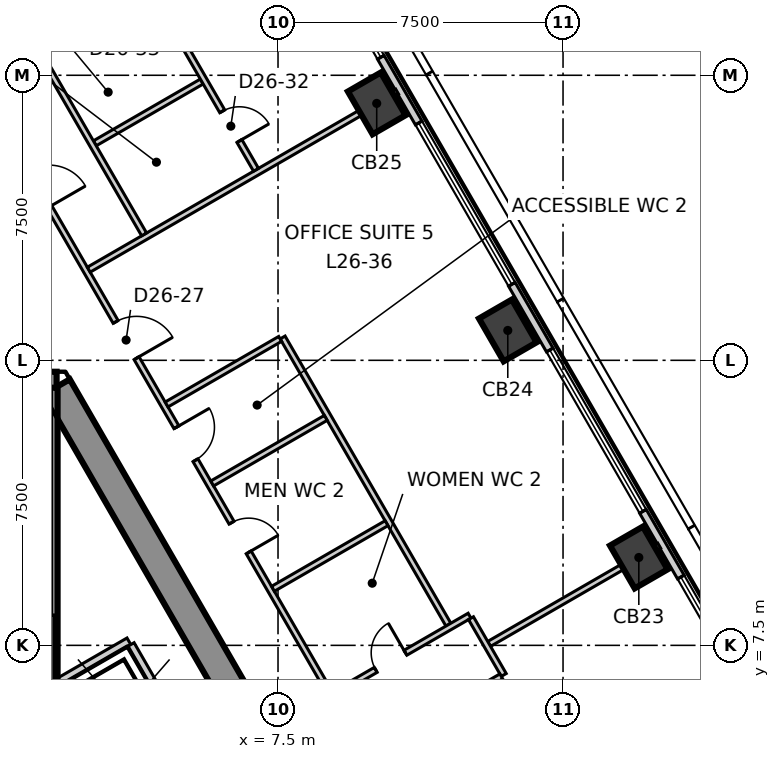
"""IFC4 building model, lengths in metres.
Left out: names, types, materials, properties, quantities, classifications, styles, units other than length and angle.
Written with IfcOpenShell. Run it as: python <this file> out.ifc"""

import sys

from ifc_helpers import new_model, si_unit, direction, frame, frame_2d, origin, origin_2d, place, context, subcontext, project, spatial, polyline, rectangle, outline, extrude, element, fill, save


model = new_model("IFC4")
c1 = context("Model", 3, precision=1e-05, world=origin(), true_north=direction((0.0, 1.0)))
c2 = subcontext(c1, "Body", "Model", "MODEL_VIEW")
j1 = project(units=[si_unit("LENGTHUNIT", "METRE"), si_unit("PLANEANGLEUNIT", "RADIAN")], contexts=[c1])
p1 = place(None, origin())
s1 = spatial("IfcSite", under=j1, at=p1, CompositionType="ELEMENT")
p2 = place(p1, origin())
s2 = spatial("IfcBuilding", under=s1, at=p2, CompositionType="ELEMENT")
p3 = place(p2, frame((0.0, 0.0, 116.3)))
s3 = spatial("IfcBuildingStorey", under=s2, at=p3, CompositionType="ELEMENT", Elevation=116.3)
p4 = place(p3, frame((1.674, 14.3, -0.3), z_axis=(0.0, 0.0, 1.0), x_axis=(-1.0, 0.0, 0.0)))
e1 = element("IfcWall", 1, at=p4, inside=s3, PredefinedType="SHEAR", context=c2, shape_type="SweptSolid", body=[
    extrude(outline(polyline([(-0.231, -0.4), (1.674, -0.4), (3.579, -0.4), (3.117, 0.4), (1.674, 0.4), (0.231, 0.4), (-0.231, -0.4)])), origin(), (0.0, 0.0, 1.0), 4.0),
])
p5 = place(p4, frame((0.974, 0.0, 0.3)))
e2 = element("IfcOpeningElement", 2, at=p5, cuts=e1, PredefinedType="OPENING", context=c2, shape_type="SweptSolid", body=[
    extrude(rectangle(XDim=1.4, YDim=2.1, at=frame_2d((0.7, 1.05))), frame((0.0, 0.41, 0.0), z_axis=(0.0, -1.0, 0.0), x_axis=(1.0, 0.0, 0.0)), (0.0, 0.0, 1.0), 0.82),
])
p6 = place(p3, frame((13.221, -5.7, -0.3), z_axis=(0.0, 0.0, 1.0), x_axis=(-0.499995765644, 0.866027848477, 0.0)))
e3 = element("IfcWall", 3, at=p6, inside=s3, PredefinedType="SHEAR", context=c2, shape_type="SweptSolid", body=[
    extrude(outline(polyline([(-0.231, -0.4), (1.732, -0.4), (3.695, -0.4), (5.658, -0.4), (7.621, -0.4), (9.584, -0.4), (11.547, -0.4), (13.51, -0.4), (15.473, -0.4), (17.436, -0.4), (19.399, -0.4), (21.362, -0.4), (23.325, -0.4), (22.863, 0.4), (20.977, 0.4), (19.091, 0.4), (17.205, 0.4), (15.319, 0.4), (13.433, 0.4), (11.547, 0.4), (9.661, 0.4), (7.775, 0.4), (5.889, 0.4), (4.003, 0.4), (2.117, 0.4), (0.231, 0.4), (-0.231, -0.4)])), origin(), (0.0, 0.0, 1.0), 4.0),
])
p7 = place(p6, frame((10.647, 0.0, 0.3)))
e4 = element("IfcOpeningElement", 4, at=p7, cuts=e3, PredefinedType="OPENING", context=c2, shape_type="SweptSolid", body=[
    extrude(rectangle(XDim=1.8, YDim=2.1, at=frame_2d((0.9, 1.05))), frame((0.0, 0.41, 0.0), z_axis=(0.0, -1.0, 0.0), x_axis=(1.0, 0.0, 0.0)), (0.0, 0.0, 1.0), 0.82),
])
for number, where, z_axis, x_axis in (
    (5, (16.994, 9.812, -0.3), (0.0, 0.0, 1.0), (-0.5, 0.866, 0.0)),
    (6, (13.546, 15.786, -0.3), (0.0, 0.0, 1.0), (-0.5, 0.866, 0.0)),
    (7, (10.097, 21.76, -0.3), (0.0, 0.0, 1.0), (-0.5, 0.866, 0.0)),
):
    element("IfcColumn", number, at=place(p3, frame(where, z_axis=z_axis, x_axis=x_axis)), inside=s3, PredefinedType="COLUMN", context=c2, shape_type="SweptSolid", body=[
        extrude(rectangle(XDim=1.3, YDim=1.0, at=origin_2d()), origin(), (0.0, 0.0, 1.0), 4.0),
    ])
p8 = place(p3, frame((32.048, -14.861, 0.0), z_axis=(0.0, 0.0, 1.0), x_axis=(-0.499996704161, 0.866027306629, 0.0)))
e8 = element("IfcWall", 8, at=p8, inside=s3, PredefinedType="ELEMENTEDWALL", context=c2, shape_type="SweptSolid", body=[
    extrude(rectangle(XDim=57.769, YDim=0.2, at=frame_2d((28.884, 0.0))), origin(), (0.0, 0.0, 1.0), 3.7),
])
p9 = place(p8, frame((2.302, 0.0, 0.9)))
e9 = element("IfcOpeningElement", 9, at=p9, cuts=e8, PredefinedType="OPENING", context=c2, shape_type="SweptSolid", body=[
    extrude(rectangle(XDim=4.9, YDim=2.5, at=frame_2d((2.45, 1.25))), frame((0.0, 0.11, 0.0), z_axis=(0.0, -1.0, 0.0), x_axis=(1.0, 0.0, 0.0)), (0.0, 0.0, 1.0), 0.22),
])
p10 = place(p8, frame((9.199, 0.0, 0.9)))
e10 = element("IfcOpeningElement", 10, at=p10, cuts=e8, PredefinedType="OPENING", context=c2, shape_type="SweptSolid", body=[
    extrude(rectangle(XDim=4.9, YDim=2.5, at=frame_2d((2.45, 1.25))), frame((0.0, 0.11, 0.0), z_axis=(0.0, -1.0, 0.0), x_axis=(1.0, 0.0, 0.0)), (0.0, 0.0, 1.0), 0.22),
])
p11 = place(p8, frame((16.097, 0.0, 0.9)))
e11 = element("IfcOpeningElement", 11, at=p11, cuts=e8, PredefinedType="OPENING", context=c2, shape_type="SweptSolid", body=[
    extrude(rectangle(XDim=4.9, YDim=2.5, at=frame_2d((2.45, 1.25))), frame((0.0, 0.11, 0.0), z_axis=(0.0, -1.0, 0.0), x_axis=(1.0, 0.0, 0.0)), (0.0, 0.0, 1.0), 0.22),
])
p12 = place(p8, frame((22.995, 0.0, 0.9)))
e12 = element("IfcOpeningElement", 12, at=p12, cuts=e8, PredefinedType="OPENING", context=c2, shape_type="SweptSolid", body=[
    extrude(rectangle(XDim=4.9, YDim=2.5, at=frame_2d((2.45, 1.25))), frame((0.0, 0.11, 0.0), z_axis=(0.0, -1.0, 0.0), x_axis=(1.0, 0.0, 0.0)), (0.0, 0.0, 1.0), 0.22),
])
p13 = place(p8, frame((29.893, 0.0, 0.9)))
e13 = element("IfcOpeningElement", 13, at=p13, cuts=e8, PredefinedType="OPENING", context=c2, shape_type="SweptSolid", body=[
    extrude(rectangle(XDim=4.9, YDim=2.5, at=frame_2d((2.45, 1.25))), frame((0.0, 0.11, 0.0), z_axis=(0.0, -1.0, 0.0), x_axis=(1.0, 0.0, 0.0)), (0.0, 0.0, 1.0), 0.22),
])
p14 = place(p8, frame((36.791, 0.0, 0.9)))
e14 = element("IfcOpeningElement", 14, at=p14, cuts=e8, PredefinedType="OPENING", context=c2, shape_type="SweptSolid", body=[
    extrude(rectangle(XDim=4.9, YDim=2.5, at=frame_2d((2.45, 1.25))), frame((0.0, 0.11, 0.0), z_axis=(0.0, -1.0, 0.0), x_axis=(1.0, 0.0, 0.0)), (0.0, 0.0, 1.0), 0.22),
])
p15 = place(p8, frame((43.689, 0.0, 0.9)))
e15 = element("IfcOpeningElement", 15, at=p15, cuts=e8, PredefinedType="OPENING", context=c2, shape_type="SweptSolid", body=[
    extrude(rectangle(XDim=4.9, YDim=2.5, at=frame_2d((2.45, 1.25))), frame((0.0, 0.11, 0.0), z_axis=(0.0, -1.0, 0.0), x_axis=(1.0, 0.0, 0.0)), (0.0, 0.0, 1.0), 0.22),
])
p16 = place(p8, frame((50.587, 0.0, 0.9)))
e16 = element("IfcOpeningElement", 16, at=p16, cuts=e8, PredefinedType="OPENING", context=c2, shape_type="SweptSolid", body=[
    extrude(rectangle(XDim=4.9, YDim=2.5, at=frame_2d((2.45, 1.25))), frame((0.0, 0.11, 0.0), z_axis=(0.0, -1.0, 0.0), x_axis=(1.0, 0.0, 0.0)), (0.0, 0.0, 1.0), 0.22),
])
p17 = place(p3, frame((13.055, 7.538, 0.0), z_axis=(0.0, 0.0, 1.0), x_axis=(0.866048717436, 0.499959617396, 0.0)))
e17 = element("IfcWall", 17, at=p17, inside=s3, PredefinedType="PARTITIONING", context=c2, shape_type="SweptSolid", body=[
    extrude(rectangle(XDim=5.168, YDim=0.15, at=frame_2d((2.584, 0.0))), origin(), (0.0, 0.0, 1.0), 3.2),
])
p18 = place(p3, frame((0.076, 21.468, 0.0), z_axis=(0.0, 0.0, 1.0), x_axis=(0.500006592492, -0.866021597574, 0.0)))
e18 = element("IfcWall", 18, at=p18, inside=s3, PredefinedType="PARTITIONING", context=c2, shape_type="SweptSolid", body=[
    extrude(rectangle(XDim=17.652, YDim=0.15, at=frame_2d((8.826, 0.0))), origin(), (0.0, 0.0, 1.0), 3.7),
])
p19 = place(p18, frame((6.303, 0.0, 0.0)))
e19 = element("IfcOpeningElement", 19, at=p19, cuts=e18, PredefinedType="OPENING", context=c2, shape_type="SweptSolid", body=[
    extrude(rectangle(XDim=1.1, YDim=2.1, at=frame_2d((0.55, 1.05))), frame((0.0, 0.085, 0.0), z_axis=(0.0, -1.0, 0.0), x_axis=(1.0, 0.0, 0.0)), (0.0, 0.0, 1.0), 0.17),
])
p20 = place(p18, frame((12.403, 0.0, 0.0)))
e20 = element("IfcOpeningElement", 20, at=p20, cuts=e18, PredefinedType="OPENING", context=c2, shape_type="SweptSolid", body=[
    extrude(rectangle(XDim=0.9, YDim=2.1, at=frame_2d((0.45, 1.05))), frame((0.0, 0.085, 0.0), z_axis=(0.0, -1.0, 0.0), x_axis=(1.0, 0.0, 0.0)), (0.0, 0.0, 1.0), 0.17),
])
p21 = place(p18, frame((9.503, 0.0, 0.0)))
e21 = element("IfcOpeningElement", 21, at=p21, cuts=e18, PredefinedType="OPENING", context=c2, shape_type="SweptSolid", body=[
    extrude(rectangle(XDim=1.0, YDim=2.1, at=frame_2d((0.5, 1.05))), frame((0.0, 0.085, 0.0), z_axis=(0.0, -1.0, 0.0), x_axis=(1.0, 0.0, 0.0)), (0.0, 0.0, 1.0), 0.17),
])
p22 = place(p18, frame((1.708, 0.0, 0.0)))
e22 = element("IfcOpeningElement", 22, at=p22, cuts=e18, PredefinedType="OPENING", context=c2, shape_type="SweptSolid", body=[
    extrude(rectangle(XDim=1.1, YDim=2.1, at=frame_2d((0.55, 1.05))), frame((0.0, 0.085, 0.0), z_axis=(0.0, -1.0, 0.0), x_axis=(1.0, 0.0, 0.0)), (0.0, 0.0, 1.0), 0.17),
])
p23 = place(p3, frame((2.52, 17.385, 0.0), z_axis=(0.0, 0.0, 1.0), x_axis=(0.866005502057, 0.500034469219, 0.0)))
e23 = element("IfcWall", 23, at=p23, inside=s3, PredefinedType="PARTITIONING", context=c2, shape_type="SweptSolid", body=[
    extrude(rectangle(XDim=9.369, YDim=0.15, at=frame_2d((4.685, 0.0))), origin(), (0.0, 0.0, 1.0), 3.7),
])
p24 = place(p3, frame((7.621, 15.601, 0.0), z_axis=(0.0, 0.0, 1.0), x_axis=(0.499937230245, -0.866061640887, 0.0)))
e24 = element("IfcWall", 24, at=p24, inside=s3, PredefinedType="PARTITIONING", context=c2, shape_type="SweptSolid", body=[
    extrude(rectangle(XDim=8.725, YDim=0.15, at=frame_2d((4.362, 0.0))), origin(), (0.0, 0.0, 1.0), 3.7),
])
p25 = place(p3, frame((4.568, 13.838, 0.0), z_axis=(0.0, 0.0, 1.0), x_axis=(0.866013532718, 0.500020560727, 0.0)))
e25 = element("IfcWall", 25, at=p25, inside=s3, PredefinedType="PARTITIONING", context=c2, shape_type="SweptSolid", body=[
    extrude(rectangle(XDim=3.45, YDim=0.15, at=frame_2d((1.725, 0.0))), origin(), (0.0, 0.0, 1.0), 3.7),
])
for number, where, z_axis, x_axis in (
    (26, (5.768, 11.76, 0.0), (0.0, 0.0, 1.0), (0.866, 0.5, 0.0)),
    (27, (7.368, 8.989, 0.0), (0.0, 0.0, 1.0), (0.866, 0.5, 0.0)),
):
    element("IfcWall", number, at=place(p3, frame(where, z_axis=z_axis, x_axis=x_axis)), inside=s3, PredefinedType="PARTITIONING", context=c2, shape_type="SweptSolid", body=[
        extrude(rectangle(XDim=3.45, YDim=0.15, at=frame_2d((1.725, 0.0))), origin(), (0.0, 0.0, 1.0), 3.7),
    ])
p26 = place(p3, frame((8.969, 6.218, 0.0), z_axis=(0.0, 0.0, 1.0), x_axis=(0.865997263264, 0.500048737644, 0.0)))
e28 = element("IfcWall", 28, at=p26, inside=s3, PredefinedType="PARTITIONING", context=c2, shape_type="SweptSolid", body=[
    extrude(rectangle(XDim=4.124, YDim=0.15, at=frame_2d((2.062, 0.0))), origin(), (0.0, 0.0, 1.0), 3.7),
])
p27 = place(p26, frame((1.274, 0.0, 0.0)))
e29 = element("IfcOpeningElement", 29, at=p27, cuts=e28, PredefinedType="OPENING", context=c2, shape_type="SweptSolid", body=[
    extrude(rectangle(XDim=0.9, YDim=2.1, at=frame_2d((0.45, 1.05))), frame((0.0, 0.085, 0.0), z_axis=(0.0, -1.0, 0.0), x_axis=(1.0, 0.0, 0.0)), (0.0, 0.0, 1.0), 0.17),
])
p28 = place(p3, frame((12.578, 8.215, 0.0), z_axis=(0.0, 0.0, 1.0), x_axis=(0.499746958151, -0.866171448282, 0.0)))
e30 = element("IfcWall", 30, at=p28, inside=s3, PredefinedType="PARTITIONING", context=c2, shape_type="SweptSolid", body=[
    extrude(rectangle(XDim=1.725, YDim=0.15, at=frame_2d((0.863, 0.0))), origin(), (0.0, 0.0, 1.0), 3.7),
])
p29 = place(p3, frame((9.869, 4.659, 0.0), z_axis=(0.0, 0.0, 1.0), x_axis=(0.866033948129, 0.499985200469, 0.0)))
e31 = element("IfcWall", 31, at=p29, inside=s3, PredefinedType="PARTITIONING", context=c2, shape_type="SweptSolid", body=[
    extrude(rectangle(XDim=4.048, YDim=0.15, at=frame_2d((2.024, 0.0))), origin(), (0.0, 0.0, 1.0), 3.7),
])
p30 = place(p3, frame((2.679, 20.71, 0.0), z_axis=(0.0, 0.0, 1.0), x_axis=(0.865977875238, 0.500082312822, 0.0)))
e32 = element("IfcWall", 32, at=p30, inside=s3, PredefinedType="PARTITIONING", context=c2, shape_type="SweptSolid", body=[
    extrude(rectangle(XDim=3.25, YDim=0.15, at=frame_2d((1.625, 0.0))), origin(), (0.0, 0.0, 1.0), 3.7),
])
p31 = place(p3, frame((4.158, 24.798, 0.0), z_axis=(0.0, 0.0, 1.0), x_axis=(0.5000309746, -0.866007519852, 0.0)))
e33 = element("IfcWall", 33, at=p31, inside=s3, PredefinedType="PARTITIONING", context=c2, shape_type="SweptSolid", body=[
    extrude(rectangle(XDim=5.526, YDim=0.15, at=frame_2d((2.763, 0.0))), origin(), (0.0, 0.0, 1.0), 3.7),
])
p32 = place(p31, frame((3.75, 0.0, 0.0)))
e34 = element("IfcOpeningElement", 34, at=p32, cuts=e33, PredefinedType="OPENING", context=c2, shape_type="SweptSolid", body=[
    extrude(rectangle(XDim=0.9, YDim=2.1, at=frame_2d((0.45, 1.05))), frame((0.0, 0.085, 0.0), z_axis=(0.0, -1.0, 0.0), x_axis=(1.0, 0.0, 0.0)), (0.0, 0.0, 1.0), 0.17),
])
p33 = place(p3, frame((1.214, 23.098, 0.0), z_axis=(0.0, 0.0, 1.0), x_axis=(0.866029041019, 0.499993700073, 0.0)))
e35 = element("IfcWall", 35, at=p33, inside=s3, PredefinedType="PARTITIONING", context=c2, shape_type="SweptSolid", body=[
    extrude(rectangle(XDim=3.324, YDim=0.15, at=frame_2d((1.662, 0.0))), origin(), (0.0, 0.0, 1.0), 3.7),
])
p34 = place(p33, frame((1.25, 0.0, 0.0)))
e36 = element("IfcOpeningElement", 36, at=p34, cuts=e35, PredefinedType="OPENING", context=c2, shape_type="SweptSolid", body=[
    extrude(rectangle(XDim=0.9, YDim=2.1, at=frame_2d((0.45, 1.05))), frame((0.0, 0.085, 0.0), z_axis=(0.0, -1.0, 0.0), x_axis=(1.0, 0.0, 0.0)), (0.0, 0.0, 1.0), 0.17),
])
p35 = place(p3, frame((1.251, 23.033, 0.0), z_axis=(0.0, 0.0, 1.0), x_axis=(0.500002931134, -0.866023711487, 0.0)))
e37 = element("IfcWall", 37, at=p35, inside=s3, PredefinedType="PARTITIONING", context=c2, shape_type="SweptSolid", body=[
    extrude(rectangle(XDim=5.45, YDim=0.15, at=frame_2d((2.725, 0.0))), origin(), (0.0, 0.0, 1.0), 3.7),
])
p36 = place(p3, frame((-0.002, 5.541, 0.0), z_axis=(0.0, 0.0, 1.0), x_axis=(0.86600155993, 0.500041296494, 0.0)))
e38 = element("IfcWall", 38, at=p36, inside=s3, PredefinedType="SOLIDWALL", context=c2, shape_type="SweptSolid", body=[
    extrude(rectangle(XDim=4.132, YDim=0.2, at=frame_2d((2.066, 0.0))), origin(), (0.0, 0.0, 1.0), 3.7),
])
p37 = place(p3, frame((3.626, 7.52, 0.0), z_axis=(0.0, 0.0, 1.0), x_axis=(0.500060147554, -0.865990674793, 0.0)))
e39 = element("IfcWall", 39, at=p37, inside=s3, PredefinedType="SOLIDWALL", context=c2, shape_type="SweptSolid", body=[
    extrude(rectangle(XDim=2.9, YDim=0.2, at=frame_2d((1.45, 0.0))), origin(), (0.0, 0.0, 1.0), 3.7),
])
p38 = place(p3, frame((1.6, 6.615, 0.0), z_axis=(0.0, 0.0, 1.0), x_axis=(0.0, 1.0, 0.0)))
e40 = element("IfcWall", 40, at=p38, inside=s3, PredefinedType="SOLIDWALL", context=c2, shape_type="SweptSolid", body=[
    extrude(rectangle(XDim=7.665, YDim=0.2, at=frame_2d((3.833, 0.0))), origin(), (0.0, 0.0, 1.0), 3.7),
])
p39 = place(p12, origin())
e41 = element("IfcWindow", 41, at=p39, inside=s3, PartitioningType="SINGLE_PANEL", PredefinedType="WINDOW", context=c2, shape_type="SweptSolid", body=[
    extrude(rectangle(XDim=4.9, YDim=2.5, at=frame_2d((2.45, 1.25))), frame((0.0, 0.03, 0.0), z_axis=(0.0, -1.0, 0.0), x_axis=(1.0, 0.0, 0.0)), (0.0, 0.0, 1.0), 0.06),
])
fill(e12, e41)
p40 = place(p13, origin())
e42 = element("IfcWindow", 42, at=p40, inside=s3, PartitioningType="SINGLE_PANEL", PredefinedType="WINDOW", context=c2, shape_type="SweptSolid", body=[
    extrude(rectangle(XDim=4.9, YDim=2.5, at=frame_2d((2.45, 1.25))), frame((0.0, 0.03, 0.0), z_axis=(0.0, -1.0, 0.0), x_axis=(1.0, 0.0, 0.0)), (0.0, 0.0, 1.0), 0.06),
])
fill(e13, e42)
p41 = place(p14, origin())
e43 = element("IfcWindow", 43, at=p41, inside=s3, PartitioningType="SINGLE_PANEL", PredefinedType="WINDOW", context=c2, shape_type="SweptSolid", body=[
    extrude(rectangle(XDim=4.9, YDim=2.5, at=frame_2d((2.45, 1.25))), frame((0.0, 0.03, 0.0), z_axis=(0.0, -1.0, 0.0), x_axis=(1.0, 0.0, 0.0)), (0.0, 0.0, 1.0), 0.06),
])
fill(e14, e43)
p42 = place(p15, origin())
e44 = element("IfcWindow", 44, at=p42, inside=s3, PartitioningType="SINGLE_PANEL", PredefinedType="WINDOW", context=c2, shape_type="SweptSolid", body=[
    extrude(rectangle(XDim=4.9, YDim=2.5, at=frame_2d((2.45, 1.25))), frame((0.0, 0.03, 0.0), z_axis=(0.0, -1.0, 0.0), x_axis=(1.0, 0.0, 0.0)), (0.0, 0.0, 1.0), 0.06),
])
fill(e15, e44)
p43 = place(p19, origin())
e45 = element("IfcDoor", 45, at=p43, inside=s3, OperationType="SINGLE_SWING_LEFT", PredefinedType="DOOR", context=c2, shape_type="SweptSolid", body=[
    extrude(rectangle(XDim=1.1, YDim=2.1, at=frame_2d((0.55, 1.05))), frame((0.0, 0.025, 0.0), z_axis=(0.0, -1.0, 0.0), x_axis=(1.0, 0.0, 0.0)), (0.0, 0.0, 1.0), 0.05),
])
fill(e19, e45)
p44 = place(p27, origin())
e46 = element("IfcDoor", 46, at=p44, inside=s3, OperationType="SINGLE_SWING_LEFT", PredefinedType="DOOR", context=c2, shape_type="SweptSolid", body=[
    extrude(rectangle(XDim=0.9, YDim=2.1, at=frame_2d((0.45, 1.05))), frame((0.0, 0.025, 0.0), z_axis=(0.0, -1.0, 0.0), x_axis=(1.0, 0.0, 0.0)), (0.0, 0.0, 1.0), 0.05),
])
fill(e29, e46)
p45 = place(p20, origin())
e47 = element("IfcDoor", 47, at=p45, inside=s3, OperationType="SINGLE_SWING_LEFT", PredefinedType="DOOR", context=c2, shape_type="SweptSolid", body=[
    extrude(rectangle(XDim=0.9, YDim=2.1, at=frame_2d((0.45, 1.05))), frame((0.0, 0.025, 0.0), z_axis=(0.0, -1.0, 0.0), x_axis=(1.0, 0.0, 0.0)), (0.0, 0.0, 1.0), 0.05),
])
fill(e20, e47)
p46 = place(p21, origin())
e48 = element("IfcDoor", 48, at=p46, inside=s3, OperationType="SINGLE_SWING_RIGHT", PredefinedType="DOOR", context=c2, shape_type="SweptSolid", body=[
    extrude(rectangle(XDim=1.0, YDim=2.1, at=frame_2d((0.5, 1.05))), frame((0.0, 0.025, 0.0), z_axis=(0.0, -1.0, 0.0), x_axis=(1.0, 0.0, 0.0)), (0.0, 0.0, 1.0), 0.05),
])
fill(e21, e48)
p47 = place(p32, origin())
e49 = element("IfcDoor", 49, at=p47, inside=s3, OperationType="SINGLE_SWING_LEFT", PredefinedType="DOOR", context=c2, shape_type="SweptSolid", body=[
    extrude(rectangle(XDim=0.9, YDim=2.1, at=frame_2d((0.45, 1.05))), frame((0.0, 0.025, 0.0), z_axis=(0.0, -1.0, 0.0), x_axis=(1.0, 0.0, 0.0)), (0.0, 0.0, 1.0), 0.05),
])
fill(e34, e49)
save(model, sys.argv[1])
